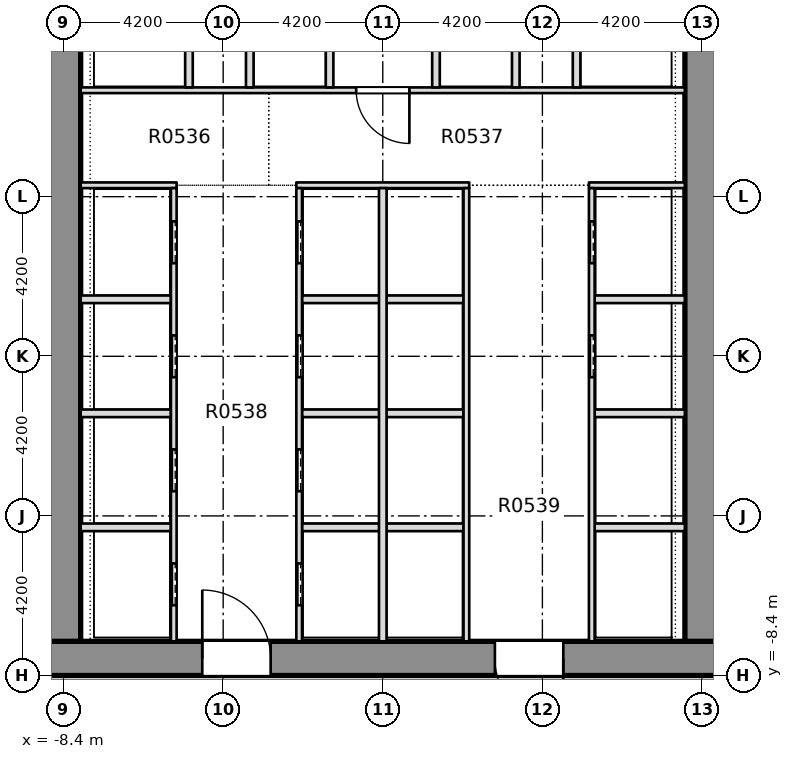
"""IFC4 building model, lengths in metres.
Left out: names, types, materials, properties, quantities, classifications, styles, units other than length and angle.
Written with IfcOpenShell. Run it as: python <this file> out.ifc"""

import sys

from ifc_helpers import new_model, si_unit, direction, frame, frame_2d, origin, place, context, subcontext, project, spatial, rectangle, extrude, element, fill, save


model = new_model("IFC4")
c1 = context("Model", 3, precision=1e-05, world=origin(), true_north=direction((0.0, 1.0)))
c2 = subcontext(c1, "Body", "Model", "MODEL_VIEW")
j1 = project(units=[si_unit("LENGTHUNIT", "METRE"), si_unit("PLANEANGLEUNIT", "RADIAN")], contexts=[c1])
p1 = place(None, origin())
s1 = spatial("IfcSite", under=j1, at=p1, CompositionType="ELEMENT")
p2 = place(p1, origin())
s2 = spatial("IfcBuilding", under=s1, at=p2, CompositionType="ELEMENT")
p3 = place(p2, frame((0.0, 0.0, 30.0)))
s3 = spatial("IfcBuildingStorey", under=s2, at=p3, CompositionType="ELEMENT", Elevation=30.0)
p4 = place(p3, frame((-11.7, -7.95, -0.4), z_axis=(0.0, 0.0, 1.0), x_axis=(1.0, 0.0, 0.0)))
e1 = element("IfcWall", 1, at=p4, inside=s3, PredefinedType="SHEAR", context=c2, shape_type="SweptSolid", body=[
    extrude(rectangle(XDim=23.4, YDim=0.9, at=frame_2d((11.7, 0.0))), origin(), (0.0, 0.0, 1.0), 4.58),
])
p5 = place(p4, frame((6.95, 0.0, 0.4)))
e2 = element("IfcOpeningElement", 2, at=p5, cuts=e1, PredefinedType="OPENING", context=c2, shape_type="SweptSolid", body=[
    extrude(rectangle(XDim=1.8, YDim=2.1, at=frame_2d((0.9, 1.05))), frame((0.0, 0.46, 0.0), z_axis=(0.0, -1.0, 0.0), x_axis=(1.0, 0.0, 0.0)), (0.0, 0.0, 1.0), 0.92),
])
p6 = place(p4, frame((14.65, 0.0, 0.4)))
e3 = element("IfcOpeningElement", 3, at=p6, cuts=e1, PredefinedType="OPENING", context=c2, shape_type="SweptSolid", body=[
    extrude(rectangle(XDim=1.8, YDim=2.1, at=frame_2d((0.9, 1.05))), frame((0.0, 0.46, 0.0), z_axis=(0.0, -1.0, 0.0), x_axis=(1.0, 0.0, 0.0)), (0.0, 0.0, 1.0), 0.92),
])
p7 = place(p3, frame((-8.4, -7.5, -0.4), z_axis=(0.0, 0.0, 1.0), x_axis=(0.0, 1.0, 0.0)))
e4 = element("IfcWall", 4, at=p7, inside=s3, PredefinedType="SHEAR", context=c2, shape_type="SweptSolid", body=[
    extrude(rectangle(XDim=28.35, YDim=0.9, at=frame_2d((14.175, 0.0))), origin(), (0.0, 0.0, 1.0), 4.58),
])
p8 = place(p7, frame((18.4, 0.0, 0.4)))
e5 = element("IfcOpeningElement", 5, at=p8, cuts=e4, PredefinedType="OPENING", context=c2, shape_type="SweptSolid", body=[
    extrude(rectangle(XDim=1.2, YDim=2.1, at=frame_2d((0.6, 1.05))), frame((0.0, 0.46, 0.0), z_axis=(0.0, -1.0, 0.0), x_axis=(1.0, 0.0, 0.0)), (0.0, 0.0, 1.0), 0.92),
])
p9 = place(p3, frame((8.4, -7.5, -0.4), z_axis=(0.0, 0.0, 1.0), x_axis=(0.0, 1.0, 0.0)))
e6 = element("IfcWall", 6, at=p9, inside=s3, PredefinedType="SHEAR", context=c2, shape_type="SweptSolid", body=[
    extrude(rectangle(XDim=28.35, YDim=0.9, at=frame_2d((14.175, 0.0))), origin(), (0.0, 0.0, 1.0), 4.58),
])
p10 = place(p9, frame((18.4, 0.0, 0.4)))
e7 = element("IfcOpeningElement", 7, at=p10, cuts=e6, PredefinedType="OPENING", context=c2, shape_type="SweptSolid", body=[
    extrude(rectangle(XDim=1.2, YDim=2.1, at=frame_2d((0.6, 1.05))), frame((0.0, 0.46, 0.0), z_axis=(0.0, -1.0, 0.0), x_axis=(1.0, 0.0, 0.0)), (0.0, 0.0, 1.0), 0.92),
])
p11 = place(p3, frame((-7.949, -4.5, 0.0), z_axis=(0.0, 0.0, 1.0), x_axis=(1.0, 0.0, 0.0)))
e8 = element("IfcWall", 8, at=p11, inside=s3, PredefinedType="PARTITIONING", context=c2, shape_type="SweptSolid", body=[
    extrude(rectangle(XDim=2.374, YDim=0.2, at=frame_2d((1.187, 0.0))), origin(), (0.0, 0.0, 1.0), 4.18),
])
p12 = place(p3, frame((-2.125, -4.5, 0.0), z_axis=(0.0, 0.0, 1.0), x_axis=(1.0, 0.0, 0.0)))
e9 = element("IfcWall", 9, at=p12, inside=s3, PredefinedType="PARTITIONING", context=c2, shape_type="SweptSolid", body=[
    extrude(rectangle(XDim=4.25, YDim=0.2, at=frame_2d((2.125, 0.0))), origin(), (0.0, 0.0, 1.0), 4.18),
])
for number, where, z_axis, x_axis in (
    (10, (5.575, -4.5, 0.0), (0.0, 0.0, 1.0), (1.0, 0.0, 0.0)),
    (11, (-7.949, -1.5, 0.0), (0.0, 0.0, 1.0), (1.0, 0.0, 0.0)),
):
    element("IfcWall", number, at=place(p3, frame(where, z_axis=z_axis, x_axis=x_axis)), inside=s3, PredefinedType="PARTITIONING", context=c2, shape_type="SweptSolid", body=[
        extrude(rectangle(XDim=2.374, YDim=0.2, at=frame_2d((1.187, 0.0))), origin(), (0.0, 0.0, 1.0), 4.18),
    ])
p13 = place(p3, frame((-2.125, -1.5, 0.0), z_axis=(0.0, 0.0, 1.0), x_axis=(1.0, 0.0, 0.0)))
e12 = element("IfcWall", 12, at=p13, inside=s3, PredefinedType="PARTITIONING", context=c2, shape_type="SweptSolid", body=[
    extrude(rectangle(XDim=4.25, YDim=0.2, at=frame_2d((2.125, 0.0))), origin(), (0.0, 0.0, 1.0), 4.18),
])
for number, where, z_axis, x_axis in (
    (13, (5.575, -1.5, 0.0), (0.0, 0.0, 1.0), (1.0, 0.0, 0.0)),
    (14, (-7.949, 1.5, 0.0), (0.0, 0.0, 1.0), (1.0, 0.0, 0.0)),
):
    element("IfcWall", number, at=place(p3, frame(where, z_axis=z_axis, x_axis=x_axis)), inside=s3, PredefinedType="PARTITIONING", context=c2, shape_type="SweptSolid", body=[
        extrude(rectangle(XDim=2.374, YDim=0.2, at=frame_2d((1.187, 0.0))), origin(), (0.0, 0.0, 1.0), 4.18),
    ])
p14 = place(p3, frame((-2.125, 1.5, 0.0), z_axis=(0.0, 0.0, 1.0), x_axis=(1.0, 0.0, 0.0)))
e15 = element("IfcWall", 15, at=p14, inside=s3, PredefinedType="PARTITIONING", context=c2, shape_type="SweptSolid", body=[
    extrude(rectangle(XDim=4.25, YDim=0.2, at=frame_2d((2.125, 0.0))), origin(), (0.0, 0.0, 1.0), 4.18),
])
p15 = place(p3, frame((5.575, 1.5, 0.0), z_axis=(0.0, 0.0, 1.0), x_axis=(1.0, 0.0, 0.0)))
e16 = element("IfcWall", 16, at=p15, inside=s3, PredefinedType="PARTITIONING", context=c2, shape_type="SweptSolid", body=[
    extrude(rectangle(XDim=2.374, YDim=0.2, at=frame_2d((1.187, 0.0))), origin(), (0.0, 0.0, 1.0), 4.18),
])
p16 = place(p3, frame((-7.949, 4.5, 0.0), z_axis=(0.0, 0.0, 1.0), x_axis=(1.0, 0.0, 0.0)))
e17 = element("IfcWall", 17, at=p16, inside=s3, PredefinedType="PARTITIONING", context=c2, shape_type="SweptSolid", body=[
    extrude(rectangle(XDim=2.524, YDim=0.15, at=frame_2d((1.262, 0.0))), origin(), (0.0, 0.0, 1.0), 4.18),
])
p17 = place(p3, frame((-2.275, 4.5, 0.0), z_axis=(0.0, 0.0, 1.0), x_axis=(1.0, 0.0, 0.0)))
e18 = element("IfcWall", 18, at=p17, inside=s3, PredefinedType="PARTITIONING", context=c2, shape_type="SweptSolid", body=[
    extrude(rectangle(XDim=4.55, YDim=0.15, at=frame_2d((2.275, 0.0))), origin(), (0.0, 0.0, 1.0), 4.18),
])
p18 = place(p3, frame((5.425, 4.5, 0.0), z_axis=(0.0, 0.0, 1.0), x_axis=(1.0, 0.0, 0.0)))
e19 = element("IfcWall", 19, at=p18, inside=s3, PredefinedType="PARTITIONING", context=c2, shape_type="SweptSolid", body=[
    extrude(rectangle(XDim=2.524, YDim=0.15, at=frame_2d((1.262, 0.0))), origin(), (0.0, 0.0, 1.0), 4.18),
])
p19 = place(p3, frame((-7.949, 7.0, 0.0), z_axis=(0.0, 0.0, 1.0), x_axis=(1.0, 0.0, 0.0)))
e20 = element("IfcWall", 20, at=p19, inside=s3, PredefinedType="PARTITIONING", context=c2, shape_type="SweptSolid", body=[
    extrude(rectangle(XDim=15.898, YDim=0.15, at=frame_2d((7.949, 0.0))), origin(), (0.0, 0.0, 1.0), 4.18),
])
p20 = place(p19, frame((7.249, 0.0, 0.0)))
e21 = element("IfcOpeningElement", 21, at=p20, cuts=e20, PredefinedType="OPENING", context=c2, shape_type="SweptSolid", body=[
    extrude(rectangle(XDim=1.4, YDim=2.1, at=frame_2d((0.7, 1.05))), frame((0.0, 0.085, 0.0), z_axis=(0.0, -1.0, 0.0), x_axis=(1.0, 0.0, 0.0)), (0.0, 0.0, 1.0), 0.17),
])
p21 = place(p3, frame((-5.5, -7.499, 0.0), z_axis=(0.0, 0.0, 1.0), x_axis=(0.0, 1.0, 0.0)))
e22 = element("IfcWall", 22, at=p21, inside=s3, PredefinedType="PARTITIONING", context=c2, shape_type="SweptSolid", body=[
    extrude(rectangle(XDim=11.924, YDim=0.15, at=frame_2d((5.962, 0.0))), origin(), (0.0, 0.0, 1.0), 4.18),
])
p22 = place(p21, frame((0.949, 0.0, 0.0)))
e23 = element("IfcOpeningElement", 23, at=p22, cuts=e22, PredefinedType="OPENING", context=c2, shape_type="SweptSolid", body=[
    extrude(rectangle(XDim=1.1, YDim=2.1, at=frame_2d((0.55, 1.05))), frame((0.0, 0.085, 0.0), z_axis=(0.0, -1.0, 0.0), x_axis=(1.0, 0.0, 0.0)), (0.0, 0.0, 1.0), 0.17),
])
p23 = place(p21, frame((3.949, 0.0, 0.0)))
e24 = element("IfcOpeningElement", 24, at=p23, cuts=e22, PredefinedType="OPENING", context=c2, shape_type="SweptSolid", body=[
    extrude(rectangle(XDim=1.1, YDim=2.1, at=frame_2d((0.55, 1.05))), frame((0.0, 0.085, 0.0), z_axis=(0.0, -1.0, 0.0), x_axis=(1.0, 0.0, 0.0)), (0.0, 0.0, 1.0), 0.17),
])
p24 = place(p21, frame((6.949, 0.0, 0.0)))
e25 = element("IfcOpeningElement", 25, at=p24, cuts=e22, PredefinedType="OPENING", context=c2, shape_type="SweptSolid", body=[
    extrude(rectangle(XDim=1.1, YDim=2.1, at=frame_2d((0.55, 1.05))), frame((0.0, 0.085, 0.0), z_axis=(0.0, -1.0, 0.0), x_axis=(1.0, 0.0, 0.0)), (0.0, 0.0, 1.0), 0.17),
])
p25 = place(p21, frame((9.949, 0.0, 0.0)))
e26 = element("IfcOpeningElement", 26, at=p25, cuts=e22, PredefinedType="OPENING", context=c2, shape_type="SweptSolid", body=[
    extrude(rectangle(XDim=1.1, YDim=2.1, at=frame_2d((0.55, 1.05))), frame((0.0, 0.085, 0.0), z_axis=(0.0, -1.0, 0.0), x_axis=(1.0, 0.0, 0.0)), (0.0, 0.0, 1.0), 0.17),
])
p26 = place(p3, frame((-5.1, 7.075, 0.0), z_axis=(0.0, 0.0, 1.0), x_axis=(0.0, 1.0, 0.0)))
e27 = element("IfcWall", 27, at=p26, inside=s3, PredefinedType="PARTITIONING", context=c2, shape_type="SweptSolid", body=[
    extrude(rectangle(XDim=2.725, YDim=0.2, at=frame_2d((1.363, 0.0))), origin(), (0.0, 0.0, 1.0), 4.18),
])
p27 = place(p3, frame((-3.5, 7.075, 0.0), z_axis=(0.0, 0.0, 1.0), x_axis=(0.0, 1.0, 0.0)))
e28 = element("IfcWall", 28, at=p27, inside=s3, PredefinedType="PARTITIONING", context=c2, shape_type="SweptSolid", body=[
    extrude(rectangle(XDim=2.85, YDim=0.2, at=frame_2d((1.425, 0.0))), origin(), (0.0, 0.0, 1.0), 4.18),
])
p28 = place(p3, frame((-2.2, -7.499, 0.0), z_axis=(0.0, 0.0, 1.0), x_axis=(0.0, 1.0, 0.0)))
e29 = element("IfcWall", 29, at=p28, inside=s3, PredefinedType="PARTITIONING", context=c2, shape_type="SweptSolid", body=[
    extrude(rectangle(XDim=11.924, YDim=0.15, at=frame_2d((5.962, 0.0))), origin(), (0.0, 0.0, 1.0), 4.18),
])
p29 = place(p28, frame((0.949, 0.0, 0.0)))
e30 = element("IfcOpeningElement", 30, at=p29, cuts=e29, PredefinedType="OPENING", context=c2, shape_type="SweptSolid", body=[
    extrude(rectangle(XDim=1.1, YDim=2.1, at=frame_2d((0.55, 1.05))), frame((0.0, 0.085, 0.0), z_axis=(0.0, -1.0, 0.0), x_axis=(1.0, 0.0, 0.0)), (0.0, 0.0, 1.0), 0.17),
])
p30 = place(p28, frame((3.949, 0.0, 0.0)))
e31 = element("IfcOpeningElement", 31, at=p30, cuts=e29, PredefinedType="OPENING", context=c2, shape_type="SweptSolid", body=[
    extrude(rectangle(XDim=1.1, YDim=2.1, at=frame_2d((0.55, 1.05))), frame((0.0, 0.085, 0.0), z_axis=(0.0, -1.0, 0.0), x_axis=(1.0, 0.0, 0.0)), (0.0, 0.0, 1.0), 0.17),
])
p31 = place(p28, frame((6.949, 0.0, 0.0)))
e32 = element("IfcOpeningElement", 32, at=p31, cuts=e29, PredefinedType="OPENING", context=c2, shape_type="SweptSolid", body=[
    extrude(rectangle(XDim=1.1, YDim=2.1, at=frame_2d((0.55, 1.05))), frame((0.0, 0.085, 0.0), z_axis=(0.0, -1.0, 0.0), x_axis=(1.0, 0.0, 0.0)), (0.0, 0.0, 1.0), 0.17),
])
p32 = place(p28, frame((9.949, 0.0, 0.0)))
e33 = element("IfcOpeningElement", 33, at=p32, cuts=e29, PredefinedType="OPENING", context=c2, shape_type="SweptSolid", body=[
    extrude(rectangle(XDim=1.1, YDim=2.1, at=frame_2d((0.55, 1.05))), frame((0.0, 0.085, 0.0), z_axis=(0.0, -1.0, 0.0), x_axis=(1.0, 0.0, 0.0)), (0.0, 0.0, 1.0), 0.17),
])
p33 = place(p3, frame((-1.4, 7.075, 0.0), z_axis=(0.0, 0.0, 1.0), x_axis=(0.0, 1.0, 0.0)))
e34 = element("IfcWall", 34, at=p33, inside=s3, PredefinedType="PARTITIONING", context=c2, shape_type="SweptSolid", body=[
    extrude(rectangle(XDim=2.85, YDim=0.2, at=frame_2d((1.425, 0.0))), origin(), (0.0, 0.0, 1.0), 4.18),
])
p34 = place(p3, frame((0.0, -7.499, 0.0), z_axis=(0.0, 0.0, 1.0), x_axis=(0.0, 1.0, 0.0)))
e35 = element("IfcWall", 35, at=p34, inside=s3, PredefinedType="PARTITIONING", context=c2, shape_type="SweptSolid", body=[
    extrude(rectangle(XDim=11.924, YDim=0.2, at=frame_2d((5.962, 0.0))), origin(), (0.0, 0.0, 1.0), 4.18),
])
p35 = place(p3, frame((1.4, 7.075, 0.0), z_axis=(0.0, 0.0, 1.0), x_axis=(0.0, 1.0, 0.0)))
e36 = element("IfcWall", 36, at=p35, inside=s3, PredefinedType="PARTITIONING", context=c2, shape_type="SweptSolid", body=[
    extrude(rectangle(XDim=2.85, YDim=0.2, at=frame_2d((1.425, 0.0))), origin(), (0.0, 0.0, 1.0), 4.18),
])
p36 = place(p3, frame((2.2, -7.499, 0.0), z_axis=(0.0, 0.0, 1.0), x_axis=(0.0, 1.0, 0.0)))
e37 = element("IfcWall", 37, at=p36, inside=s3, PredefinedType="PARTITIONING", context=c2, shape_type="SweptSolid", body=[
    extrude(rectangle(XDim=11.924, YDim=0.15, at=frame_2d((5.962, 0.0))), origin(), (0.0, 0.0, 1.0), 4.18),
])
p37 = place(p3, frame((3.5, 7.075, 0.0), z_axis=(0.0, 0.0, 1.0), x_axis=(0.0, 1.0, 0.0)))
e38 = element("IfcWall", 38, at=p37, inside=s3, PredefinedType="PARTITIONING", context=c2, shape_type="SweptSolid", body=[
    extrude(rectangle(XDim=2.85, YDim=0.2, at=frame_2d((1.425, 0.0))), origin(), (0.0, 0.0, 1.0), 4.18),
])
p38 = place(p3, frame((5.1, 7.075, 0.0), z_axis=(0.0, 0.0, 1.0), x_axis=(0.0, 1.0, 0.0)))
e39 = element("IfcWall", 39, at=p38, inside=s3, PredefinedType="PARTITIONING", context=c2, shape_type="SweptSolid", body=[
    extrude(rectangle(XDim=2.725, YDim=0.2, at=frame_2d((1.363, 0.0))), origin(), (0.0, 0.0, 1.0), 4.18),
])
p39 = place(p3, frame((5.5, -7.499, 0.0), z_axis=(0.0, 0.0, 1.0), x_axis=(0.0, 1.0, 0.0)))
e40 = element("IfcWall", 40, at=p39, inside=s3, PredefinedType="PARTITIONING", context=c2, shape_type="SweptSolid", body=[
    extrude(rectangle(XDim=11.924, YDim=0.15, at=frame_2d((5.962, 0.0))), origin(), (0.0, 0.0, 1.0), 4.18),
])
p40 = place(p39, frame((6.949, 0.0, 0.0)))
e41 = element("IfcOpeningElement", 41, at=p40, cuts=e40, PredefinedType="OPENING", context=c2, shape_type="SweptSolid", body=[
    extrude(rectangle(XDim=1.1, YDim=2.1, at=frame_2d((0.55, 1.05))), frame((0.0, 0.085, 0.0), z_axis=(0.0, -1.0, 0.0), x_axis=(1.0, 0.0, 0.0)), (0.0, 0.0, 1.0), 0.17),
])
p41 = place(p39, frame((9.949, 0.0, 0.0)))
e42 = element("IfcOpeningElement", 42, at=p41, cuts=e40, PredefinedType="OPENING", context=c2, shape_type="SweptSolid", body=[
    extrude(rectangle(XDim=1.1, YDim=2.1, at=frame_2d((0.55, 1.05))), frame((0.0, 0.085, 0.0), z_axis=(0.0, -1.0, 0.0), x_axis=(1.0, 0.0, 0.0)), (0.0, 0.0, 1.0), 0.17),
])
p42 = place(p22, origin())
e43 = element("IfcDoor", 43, at=p42, inside=s3, OperationType="SLIDING_TO_RIGHT", PredefinedType="DOOR", context=c2, shape_type="SweptSolid", body=[
    extrude(rectangle(XDim=1.1, YDim=2.1, at=frame_2d((0.55, 1.05))), frame((0.0, 0.025, 0.0), z_axis=(0.0, -1.0, 0.0), x_axis=(1.0, 0.0, 0.0)), (0.0, 0.0, 1.0), 0.05),
])
fill(e23, e43)
p43 = place(p23, origin())
e44 = element("IfcDoor", 44, at=p43, inside=s3, OperationType="SLIDING_TO_RIGHT", PredefinedType="DOOR", context=c2, shape_type="SweptSolid", body=[
    extrude(rectangle(XDim=1.1, YDim=2.1, at=frame_2d((0.55, 1.05))), frame((0.0, 0.025, 0.0), z_axis=(0.0, -1.0, 0.0), x_axis=(1.0, 0.0, 0.0)), (0.0, 0.0, 1.0), 0.05),
])
fill(e24, e44)
p44 = place(p24, origin())
e45 = element("IfcDoor", 45, at=p44, inside=s3, OperationType="SLIDING_TO_RIGHT", PredefinedType="DOOR", context=c2, shape_type="SweptSolid", body=[
    extrude(rectangle(XDim=1.1, YDim=2.1, at=frame_2d((0.55, 1.05))), frame((0.0, 0.025, 0.0), z_axis=(0.0, -1.0, 0.0), x_axis=(1.0, 0.0, 0.0)), (0.0, 0.0, 1.0), 0.05),
])
fill(e25, e45)
p45 = place(p25, origin())
e46 = element("IfcDoor", 46, at=p45, inside=s3, OperationType="SLIDING_TO_RIGHT", PredefinedType="DOOR", context=c2, shape_type="SweptSolid", body=[
    extrude(rectangle(XDim=1.1, YDim=2.1, at=frame_2d((0.55, 1.05))), frame((0.0, 0.025, 0.0), z_axis=(0.0, -1.0, 0.0), x_axis=(1.0, 0.0, 0.0)), (0.0, 0.0, 1.0), 0.05),
])
fill(e26, e46)
p46 = place(p29, origin())
e47 = element("IfcDoor", 47, at=p46, inside=s3, OperationType="SLIDING_TO_RIGHT", PredefinedType="DOOR", context=c2, shape_type="SweptSolid", body=[
    extrude(rectangle(XDim=1.1, YDim=2.1, at=frame_2d((0.55, 1.05))), frame((0.0, 0.025, 0.0), z_axis=(0.0, -1.0, 0.0), x_axis=(1.0, 0.0, 0.0)), (0.0, 0.0, 1.0), 0.05),
])
fill(e30, e47)
p47 = place(p30, origin())
e48 = element("IfcDoor", 48, at=p47, inside=s3, OperationType="SLIDING_TO_RIGHT", PredefinedType="DOOR", context=c2, shape_type="SweptSolid", body=[
    extrude(rectangle(XDim=1.1, YDim=2.1, at=frame_2d((0.55, 1.05))), frame((0.0, 0.025, 0.0), z_axis=(0.0, -1.0, 0.0), x_axis=(1.0, 0.0, 0.0)), (0.0, 0.0, 1.0), 0.05),
])
fill(e31, e48)
p48 = place(p31, origin())
e49 = element("IfcDoor", 49, at=p48, inside=s3, OperationType="SLIDING_TO_RIGHT", PredefinedType="DOOR", context=c2, shape_type="SweptSolid", body=[
    extrude(rectangle(XDim=1.1, YDim=2.1, at=frame_2d((0.55, 1.05))), frame((0.0, 0.025, 0.0), z_axis=(0.0, -1.0, 0.0), x_axis=(1.0, 0.0, 0.0)), (0.0, 0.0, 1.0), 0.05),
])
fill(e32, e49)
p49 = place(p32, origin())
e50 = element("IfcDoor", 50, at=p49, inside=s3, OperationType="SLIDING_TO_RIGHT", PredefinedType="DOOR", context=c2, shape_type="SweptSolid", body=[
    extrude(rectangle(XDim=1.1, YDim=2.1, at=frame_2d((0.55, 1.05))), frame((0.0, 0.025, 0.0), z_axis=(0.0, -1.0, 0.0), x_axis=(1.0, 0.0, 0.0)), (0.0, 0.0, 1.0), 0.05),
])
fill(e33, e50)
p50 = place(p40, origin())
e51 = element("IfcDoor", 51, at=p50, inside=s3, OperationType="SLIDING_TO_RIGHT", PredefinedType="DOOR", context=c2, shape_type="SweptSolid", body=[
    extrude(rectangle(XDim=1.1, YDim=2.1, at=frame_2d((0.55, 1.05))), frame((0.0, 0.025, 0.0), z_axis=(0.0, -1.0, 0.0), x_axis=(1.0, 0.0, 0.0)), (0.0, 0.0, 1.0), 0.05),
])
fill(e41, e51)
p51 = place(p41, origin())
e52 = element("IfcDoor", 52, at=p51, inside=s3, OperationType="SLIDING_TO_RIGHT", PredefinedType="DOOR", context=c2, shape_type="SweptSolid", body=[
    extrude(rectangle(XDim=1.1, YDim=2.1, at=frame_2d((0.55, 1.05))), frame((0.0, 0.025, 0.0), z_axis=(0.0, -1.0, 0.0), x_axis=(1.0, 0.0, 0.0)), (0.0, 0.0, 1.0), 0.05),
])
fill(e42, e52)
p52 = place(p20, origin())
e53 = element("IfcDoor", 53, at=p52, inside=s3, OperationType="SINGLE_SWING_RIGHT", PredefinedType="DOOR", context=c2, shape_type="SweptSolid", body=[
    extrude(rectangle(XDim=1.4, YDim=2.1, at=frame_2d((0.7, 1.05))), frame((0.0, 0.025, 0.0), z_axis=(0.0, -1.0, 0.0), x_axis=(1.0, 0.0, 0.0)), (0.0, 0.0, 1.0), 0.05),
])
fill(e21, e53)
p53 = place(p5, origin())
e54 = element("IfcDoor", 54, at=p53, inside=s3, OperationType="SINGLE_SWING_LEFT", PredefinedType="DOOR", context=c2, shape_type="SweptSolid", body=[
    extrude(rectangle(XDim=1.8, YDim=2.1, at=frame_2d((0.9, 1.05))), frame((0.0, 0.025, 0.0), z_axis=(0.0, -1.0, 0.0), x_axis=(1.0, 0.0, 0.0)), (0.0, 0.0, 1.0), 0.05),
])
fill(e2, e54)
p54 = place(p6, origin())
e55 = element("IfcDoor", 55, at=p54, inside=s3, OperationType="SINGLE_SWING_LEFT", PredefinedType="DOOR", context=c2, shape_type="SweptSolid", body=[
    extrude(rectangle(XDim=1.8, YDim=2.1, at=frame_2d((0.9, 1.05))), frame((0.0, 0.025, 0.0), z_axis=(0.0, -1.0, 0.0), x_axis=(1.0, 0.0, 0.0)), (0.0, 0.0, 1.0), 0.05),
])
fill(e3, e55)
save(model, sys.argv[1])
